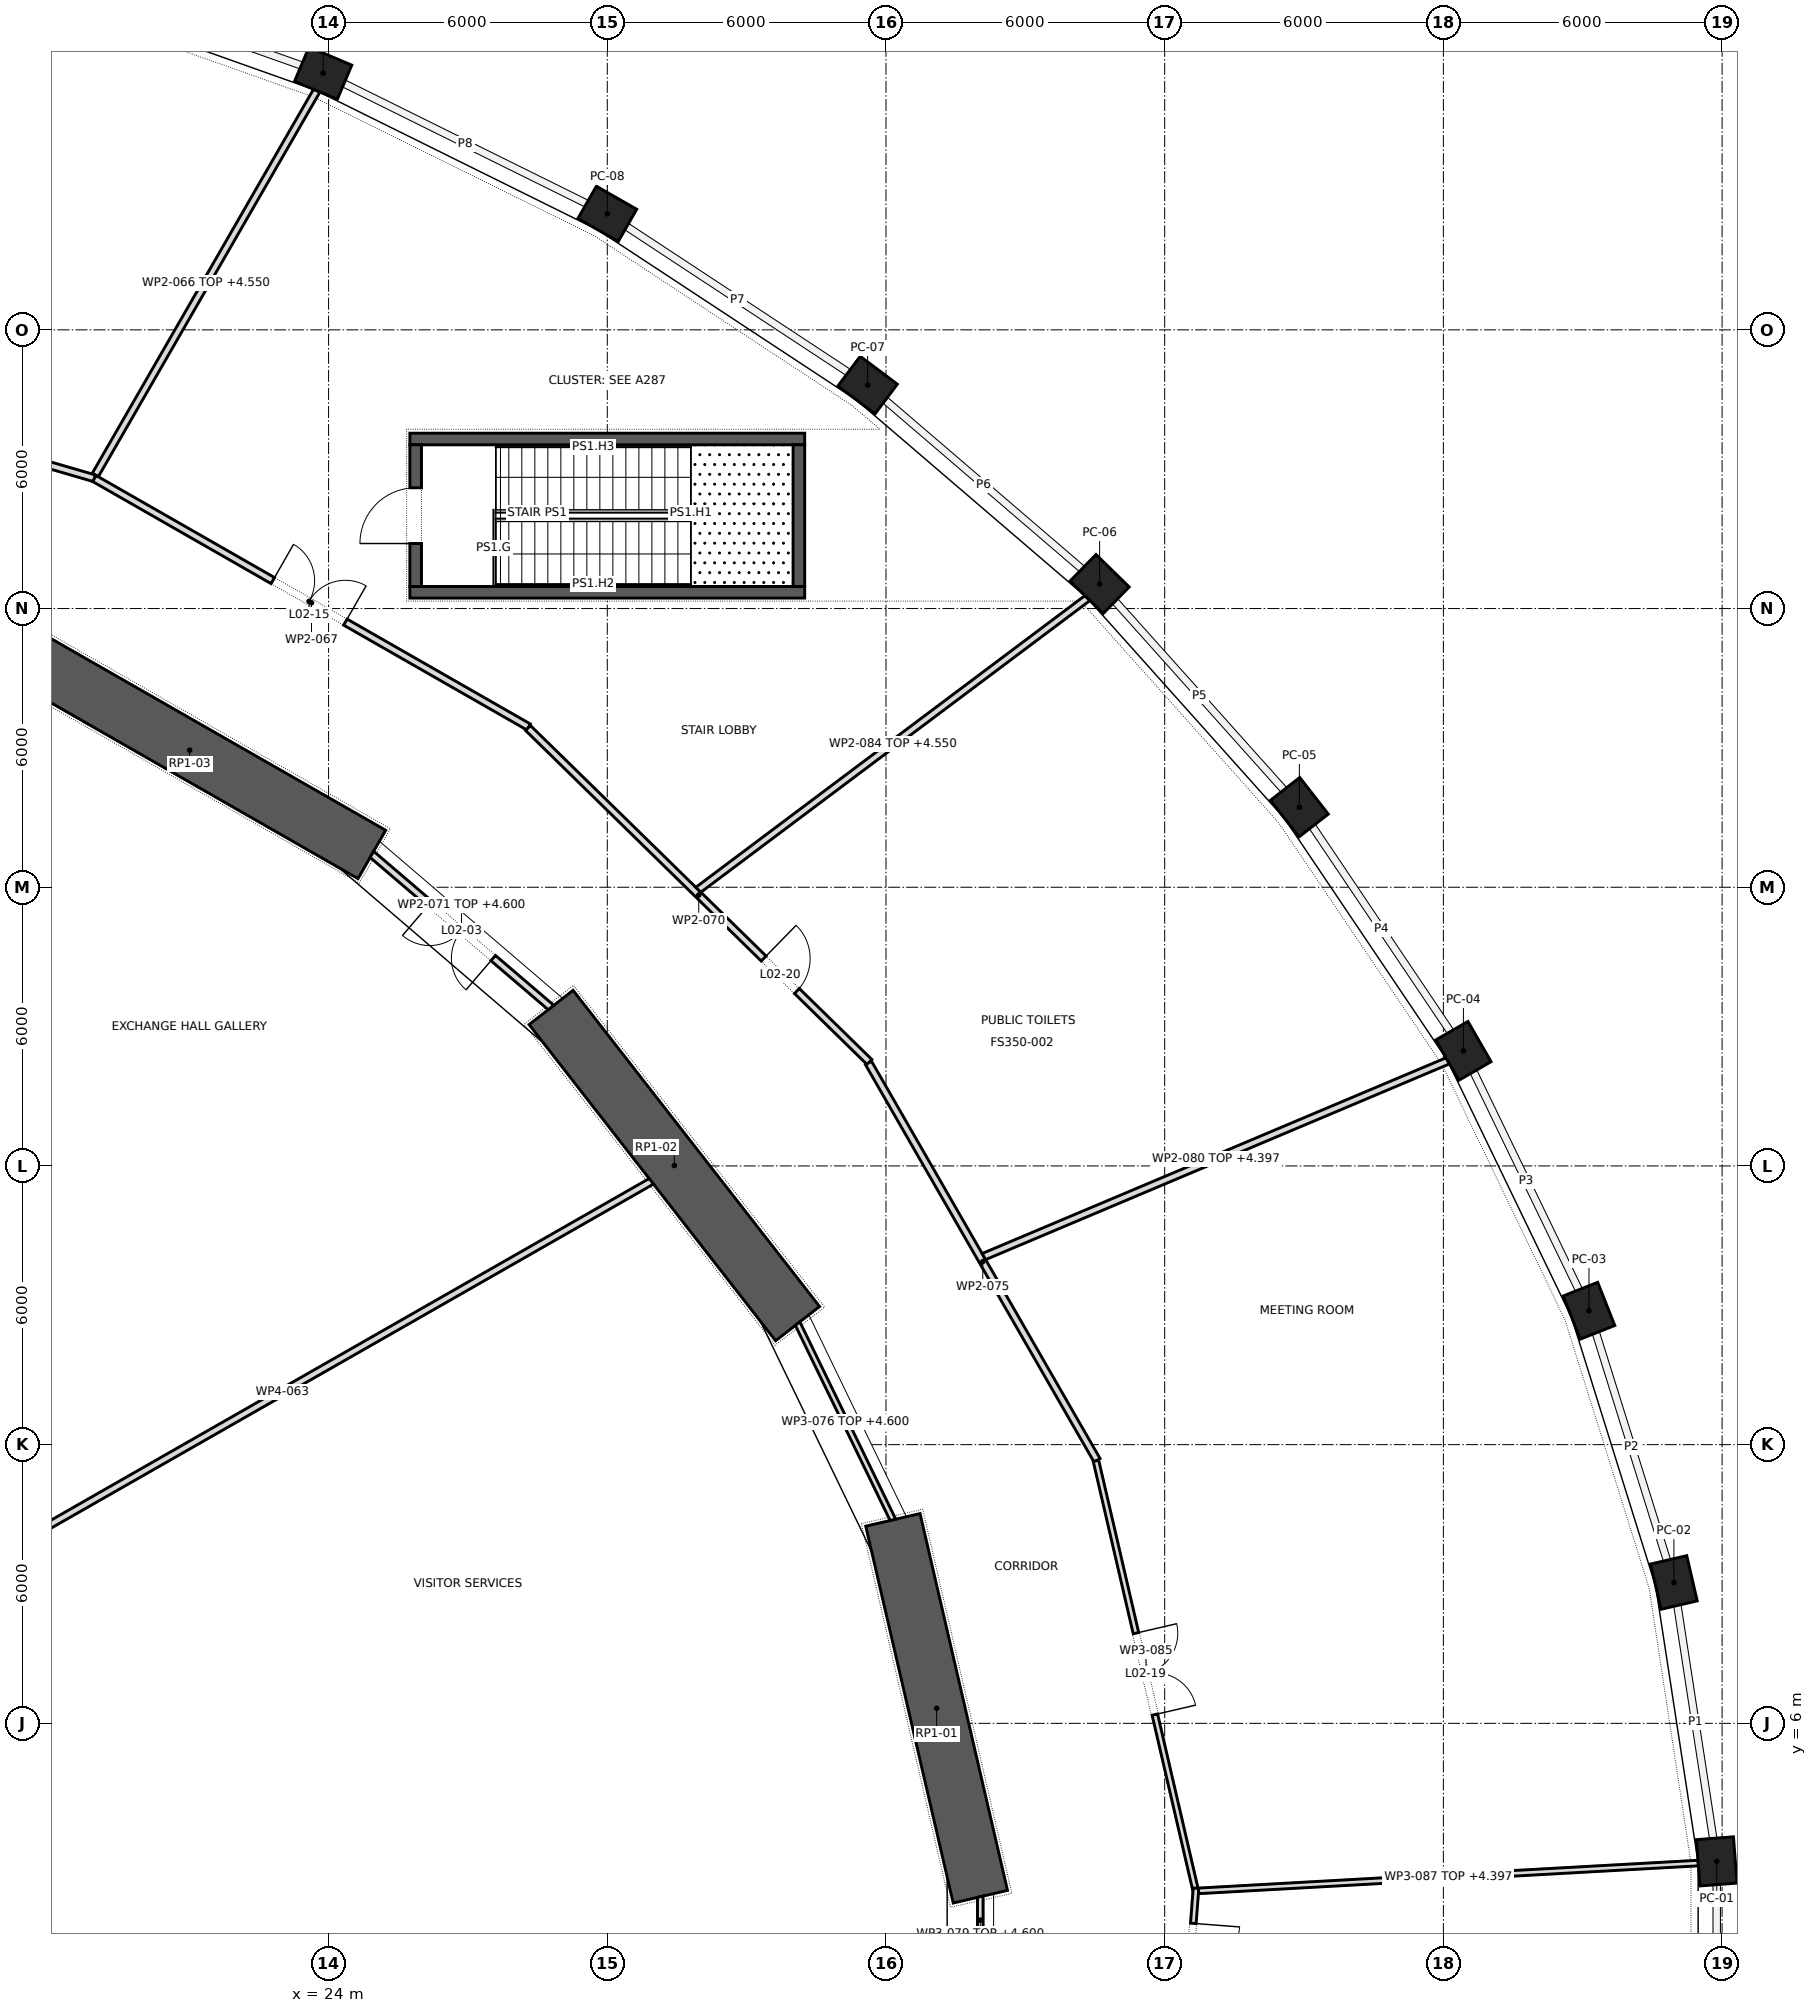
"""IFC4 building model, lengths in metres.
Left out: names, types, materials, properties, quantities, classifications, styles, units other than length and angle.
Written with IfcOpenShell. Run it as: python <this file> out.ifc"""

import sys

from ifc_helpers import new_model, si_unit, direction, frame, frame_2d, origin, origin_2d, place, context, subcontext, project, spatial, polyline, rectangle, outline, extrude, element, fill, save


model = new_model("IFC4")
c1 = context("Model", 3, precision=1e-05, world=origin(), true_north=direction((0.0, 1.0)))
c2 = subcontext(c1, "Body", "Model", "MODEL_VIEW")
j1 = project(units=[si_unit("LENGTHUNIT", "METRE"), si_unit("PLANEANGLEUNIT", "RADIAN")], contexts=[c1])
p1 = place(None, origin())
s1 = spatial("IfcSite", under=j1, at=p1, CompositionType="ELEMENT")
p2 = place(p1, origin())
s2 = spatial("IfcBuilding", under=s1, at=p2, CompositionType="ELEMENT")
p3 = place(p2, frame((0.0, 0.0, 12.5)))
s3 = spatial("IfcBuildingStorey", under=s2, at=p3, CompositionType="ELEMENT", Elevation=12.5)
for number, where, z_axis, x_axis in (
    (1, (53.885, 3.028, 0.0), (0.0, 0.0, 1.0), (-0.076, 0.997, 0.0)),
    (2, (52.962, 9.033, 0.0), (0.0, 0.0, 1.0), (-0.226, 0.974, 0.0)),
    (3, (51.134, 14.883, 0.0), (0.0, 0.0, 1.0), (-0.368, 0.93, 0.0)),
    (4, (48.431, 20.478, 0.0), (0.0, 0.0, 1.0), (-0.499, 0.867, 0.0)),
    (5, (44.899, 25.723, 0.0), (0.0, 0.0, 1.0), (-0.615, 0.789, 0.0)),
    (6, (40.599, 30.528, 0.0), (0.0, 0.0, 1.0), (-0.715, 0.699, 0.0)),
    (7, (35.605, 34.81, 0.0), (0.0, 0.0, 1.0), (-0.799, 0.601, 0.0)),
    (8, (30.001, 38.497, 0.0), (0.0, 0.0, 1.0), (-0.868, 0.497, 0.0)),
    (9, (23.884, 41.525, 0.0), (0.0, 0.0, 1.0), (-0.921, 0.389, 0.0)),
):
    element("IfcColumn", number, at=place(p3, frame(where, z_axis=z_axis, x_axis=x_axis)), inside=s3, PredefinedType="COLUMN", context=c2, shape_type="SweptSolid", body=[
        extrude(rectangle(XDim=1.0, YDim=0.8, at=origin_2d()), origin(), (0.0, 0.0, 1.0), 5.5),
    ])
p4 = place(p3, frame((38.032, 2.267, 0.0), z_axis=(0.0, 0.0, 1.0), x_axis=(-0.226058185805, 0.974113800657, 0.0)))
e10 = element("IfcWall", 10, at=p4, inside=s3, PredefinedType="SHEAR", context=c2, shape_type="SweptSolid", body=[
    extrude(rectangle(XDim=8.329, YDim=1.2, at=frame_2d((4.165, 0.0))), origin(), (0.0, 0.0, 1.0), 5.5),
])
p5 = place(p3, frame((34.097, 14.605, 0.0), z_axis=(0.0, 0.0, 1.0), x_axis=(-0.614825322247, 0.788663314174, 0.0)))
e11 = element("IfcWall", 11, at=p5, inside=s3, PredefinedType="SHEAR", context=c2, shape_type="SweptSolid", body=[
    extrude(rectangle(XDim=8.632, YDim=1.2, at=frame_2d((4.316, 0.0))), origin(), (0.0, 0.0, 1.0), 5.5),
])
p6 = place(p3, frame((24.931, 24.706, 0.0), z_axis=(0.0, 0.0, 1.0), x_axis=(-0.867760656864, 0.496982336103, 0.0)))
e12 = element("IfcWall", 12, at=p6, inside=s3, PredefinedType="SHEAR", context=c2, shape_type="SweptSolid", body=[
    extrude(rectangle(XDim=9.038, YDim=1.2, at=frame_2d((4.519, 0.0))), origin(), (0.0, 0.0, 1.0), 5.5),
])
for number, where, z_axis, x_axis in (
    (13, (25.75, 33.65, 0.0), (0.0, 0.0, 1.0), (1.0, 0.0, 0.0)),
    (14, (25.75, 30.35, 0.0), (0.0, 0.0, 1.0), (1.0, 0.0, 0.0)),
):
    element("IfcWall", number, at=place(p3, frame(where, z_axis=z_axis, x_axis=x_axis)), inside=s3, PredefinedType="SHEAR", context=c2, shape_type="SweptSolid", body=[
        extrude(rectangle(XDim=8.5, YDim=0.25, at=frame_2d((4.25, 0.0))), origin(), (0.0, 0.0, 1.0), 5.15),
    ])
p7 = place(p3, frame((25.875, 30.475, 0.0), z_axis=(0.0, 0.0, 1.0), x_axis=(0.0, 1.0, 0.0)))
e15 = element("IfcWall", 15, at=p7, inside=s3, PredefinedType="SHEAR", context=c2, shape_type="SweptSolid", body=[
    extrude(rectangle(XDim=3.05, YDim=0.25, at=frame_2d((1.525, 0.0))), origin(), (0.0, 0.0, 1.0), 5.15),
])
p8 = place(p7, frame((0.925, 0.0, 0.0)))
e16 = element("IfcOpeningElement", 16, at=p8, cuts=e15, PredefinedType="OPENING", context=c2, shape_type="SweptSolid", body=[
    extrude(rectangle(XDim=1.2, YDim=2.1, at=frame_2d((0.6, 1.05))), frame((0.0, 0.137, 0.0), z_axis=(0.0, -1.0, 0.0), x_axis=(1.0, 0.0, 0.0)), (0.0, 0.0, 1.0), 0.274),
])
p9 = place(p3, frame((34.125, 30.475, 0.0), z_axis=(0.0, 0.0, 1.0), x_axis=(0.0, 1.0, 0.0)))
e17 = element("IfcWall", 17, at=p9, inside=s3, PredefinedType="SHEAR", context=c2, shape_type="SweptSolid", body=[
    extrude(rectangle(XDim=3.05, YDim=0.25, at=frame_2d((1.525, 0.0))), origin(), (0.0, 0.0, 1.0), 5.15),
])
p10 = place(p3, frame((8.446, 35.862, 0.0), z_axis=(0.0, 0.0, 1.0), x_axis=(0.96020899529, -0.27928244729, 0.0)))
e18 = element("IfcWall", 18, at=p10, inside=s3, PredefinedType="PARTITIONING", context=c2, shape_type="SweptSolid", body=[
    extrude(rectangle(XDim=10.95, YDim=0.15, at=frame_2d((5.475, 0.0))), origin(), (0.0, 0.0, 1.0), 5.15),
])
p11 = place(p3, frame((15.06, 8.594, 0.0), z_axis=(0.0, 0.0, 1.0), x_axis=(0.868344118251, 0.495962188376, 0.0)))
e19 = element("IfcWall", 19, at=p11, inside=s3, PredefinedType="PARTITIONING", context=c2, shape_type="SweptSolid", body=[
    extrude(outline(polyline([(0.0, -0.075), (18.308, -0.075), (18.287, 0.075), (0.0, 0.075), (0.0, -0.075)])), origin(), (0.0, 0.0, 1.0), 5.15),
])
p12 = place(p3, frame((18.978, 32.876, 0.0), z_axis=(0.0, 0.0, 1.0), x_axis=(0.499214042651, 0.866478701192, 0.0)))
e20 = element("IfcWall", 20, at=p12, inside=s3, PredefinedType="PARTITIONING", context=c2, shape_type="SweptSolid", body=[
    extrude(outline(polyline([(0.0, -0.075), (9.558, -0.075), (9.54, 0.075), (0.0, 0.075), (0.0, -0.075)])), origin(), (0.0, 0.0, 1.0), 4.55),
])
p13 = place(p3, frame((18.958, 32.8, 0.0), z_axis=(0.0, 0.0, 1.0), x_axis=(0.867958465669, -0.496636790697, 0.0)))
e21 = element("IfcWall", 21, at=p13, inside=s3, PredefinedType="PARTITIONING", context=c2, shape_type="SweptSolid", body=[
    extrude(rectangle(XDim=10.772, YDim=0.15, at=frame_2d((5.386, 0.0))), origin(), (0.0, 0.0, 1.0), 5.15),
])
p14 = place(p13, frame((4.425, 0.0, 0.0)))
e22 = element("IfcOpeningElement", 22, at=p14, cuts=e21, PredefinedType="OPENING", context=c2, shape_type="SweptSolid", body=[
    extrude(rectangle(XDim=1.8, YDim=2.1, at=frame_2d((0.9, 1.05))), frame((0.0, 0.087, 0.0), z_axis=(0.0, -1.0, 0.0), x_axis=(1.0, 0.0, 0.0)), (0.0, 0.0, 1.0), 0.174),
])
p15 = place(p3, frame((28.294, 27.428, 0.0), z_axis=(0.0, 0.0, 1.0), x_axis=(0.71483918539, -0.699288880958, 0.0)))
e23 = element("IfcWall", 23, at=p15, inside=s3, PredefinedType="PARTITIONING", context=c2, shape_type="SweptSolid", body=[
    extrude(rectangle(XDim=10.283, YDim=0.15, at=frame_2d((5.142, 0.0))), origin(), (0.0, 0.0, 1.0), 5.15),
])
p16 = place(p15, frame((7.097, 0.0, 0.0)))
e24 = element("IfcOpeningElement", 24, at=p16, cuts=e23, PredefinedType="OPENING", context=c2, shape_type="SweptSolid", body=[
    extrude(rectangle(XDim=1.0, YDim=2.1, at=frame_2d((0.5, 1.05))), frame((0.0, 0.087, 0.0), z_axis=(0.0, -1.0, 0.0), x_axis=(1.0, 0.0, 0.0)), (0.0, 0.0, 1.0), 0.174),
])
p17 = place(p3, frame((28.789, 21.411, 0.0), z_axis=(0.0, 0.0, 1.0), x_axis=(-0.760084552743, 0.649824185978, 0.0)))
e25 = element("IfcWall", 25, at=p17, inside=s3, PredefinedType="PARTITIONING", context=c2, shape_type="SweptSolid", body=[
    extrude(outline(polyline([(-0.015, -0.075), (5.089, -0.075), (5.061, 0.075), (0.015, 0.075), (-0.015, -0.075)])), origin(), (0.0, 0.0, 1.0), 4.6),
])
p18 = place(p17, frame((1.638, 0.0, 0.0)))
e26 = element("IfcOpeningElement", 26, at=p18, cuts=e25, PredefinedType="OPENING", context=c2, shape_type="SweptSolid", body=[
    extrude(rectangle(XDim=1.8, YDim=2.1, at=frame_2d((0.9, 1.05))), frame((0.0, 0.087, 0.0), z_axis=(0.0, -1.0, 0.0), x_axis=(1.0, 0.0, 0.0)), (0.0, 0.0, 1.0), 0.174),
])
p19 = place(p3, frame((35.624, 20.216, 0.0), z_axis=(0.0, 0.0, 1.0), x_axis=(0.49865472402, -0.866800707321, 0.0)))
e27 = element("IfcWall", 27, at=p19, inside=s3, PredefinedType="PARTITIONING", context=c2, shape_type="SweptSolid", body=[
    extrude(rectangle(XDim=9.868, YDim=0.15, at=frame_2d((4.934, 0.0))), origin(), (0.0, 0.0, 1.0), 5.15),
])
p20 = place(p3, frame((36.15, 10.38, 0.0), z_axis=(0.0, 0.0, 1.0), x_axis=(-0.436936398764, 0.899492403212, 0.0)))
e28 = element("IfcWall", 28, at=p20, inside=s3, PredefinedType="PARTITIONING", context=c2, shape_type="SweptSolid", body=[
    extrude(outline(polyline([(-0.014, -0.06), (4.711, -0.06), (4.685, 0.06), (0.014, 0.06), (-0.014, -0.06)])), origin(), (0.0, 0.0, 1.0), 4.6),
])
p21 = place(p3, frame((38.03, 1.26, 0.0), z_axis=(0.0, 0.0, 1.0), x_axis=(0.0, 1.0, 0.0)))
e29 = element("IfcWall", 29, at=p21, inside=s3, PredefinedType="PARTITIONING", context=c2, shape_type="SweptSolid", body=[
    extrude(outline(polyline([(0.0, -0.06), (1.021, -0.06), (0.994, 0.06), (0.0, 0.06), (0.0, -0.06)])), origin(), (0.0, 0.0, 1.0), 4.6),
])
p22 = place(p3, frame((38.107, 16.048, 0.0), z_axis=(0.0, 0.0, 1.0), x_axis=(0.92132899404, 0.3887838535, 0.0)))
e30 = element("IfcWall", 30, at=p22, inside=s3, PredefinedType="PARTITIONING", context=c2, shape_type="SweptSolid", body=[
    extrude(outline(polyline([(0.009, -0.075), (10.849, -0.075), (10.831, 0.075), (-0.009, 0.075), (0.009, -0.075)])), origin(), (0.0, 0.0, 1.0), 4.397),
])
p23 = place(p3, frame((40.337, 30.226, 0.0), z_axis=(0.0, 0.0, 1.0), x_axis=(-0.800117504973, -0.599843294732, 0.0)))
e31 = element("IfcWall", 31, at=p23, inside=s3, PredefinedType="PARTITIONING", context=c2, shape_type="SweptSolid", body=[
    extrude(outline(polyline([(0.011, -0.075), (10.482, -0.075), (10.459, 0.075), (-0.011, 0.075), (0.011, -0.075)])), origin(), (0.0, 0.0, 1.0), 4.55),
])
p24 = place(p3, frame((40.521, 11.65, 0.0), z_axis=(0.0, 0.0, 1.0), x_axis=(0.226075864332, -0.974109697912, 0.0)))
e32 = element("IfcWall", 32, at=p24, inside=s3, PredefinedType="PARTITIONING", context=c2, shape_type="SweptSolid", body=[
    extrude(rectangle(XDim=9.527, YDim=0.12, at=frame_2d((4.763, 0.0))), origin(), (0.0, 0.0, 1.0), 5.15),
])
p25 = place(p24, frame((3.807, 0.0, 0.0)))
e33 = element("IfcOpeningElement", 33, at=p25, cuts=e32, PredefinedType="OPENING", context=c2, shape_type="SweptSolid", body=[
    extrude(rectangle(XDim=1.8, YDim=2.1, at=frame_2d((0.9, 1.05))), frame((0.0, 0.072, 0.0), z_axis=(0.0, -1.0, 0.0), x_axis=(1.0, 0.0, 0.0)), (0.0, 0.0, 1.0), 0.144),
])
p26 = place(p3, frame((41.947, -7.04, 0.0), z_axis=(0.0, 0.0, 1.0), x_axis=(0.076437580216, 0.997074368506, 0.0)))
e34 = element("IfcWall", 34, at=p26, inside=s3, PredefinedType="PARTITIONING", context=c2, shape_type="SweptSolid", body=[
    extrude(rectangle(XDim=9.518, YDim=0.12, at=frame_2d((4.759, 0.0))), origin(), (0.0, 0.0, 1.0), 5.15),
])
p27 = place(p26, frame((7.759, 0.0, 0.0)))
e35 = element("IfcOpeningElement", 35, at=p27, cuts=e34, PredefinedType="OPENING", context=c2, shape_type="SweptSolid", body=[
    extrude(rectangle(XDim=1.0, YDim=2.1, at=frame_2d((0.5, 1.05))), frame((0.0, 0.072, 0.0), z_axis=(0.0, -1.0, 0.0), x_axis=(1.0, 0.0, 0.0)), (0.0, 0.0, 1.0), 0.144),
])
p28 = place(p3, frame((53.487, 2.992, 0.0), z_axis=(0.0, 0.0, 1.0), x_axis=(-0.998454909458, -0.055567920423, 0.0)))
e36 = element("IfcWall", 36, at=p28, inside=s3, PredefinedType="PARTITIONING", context=c2, shape_type="SweptSolid", body=[
    extrude(outline(polyline([(0.001, -0.06), (10.773, -0.06), (10.773, 0.06), (-0.001, 0.06), (0.001, -0.06)])), origin(), (0.0, 0.0, 1.0), 4.397),
])
p29 = place(p8, origin())
e37 = element("IfcDoor", 37, at=p29, inside=s3, OperationType="SINGLE_SWING_RIGHT", PredefinedType="DOOR", context=c2, shape_type="SweptSolid", body=[
    extrude(rectangle(XDim=1.2, YDim=2.1, at=frame_2d((0.6, 1.05))), frame((0.0, 0.025, 0.0), z_axis=(0.0, -1.0, 0.0), x_axis=(1.0, 0.0, 0.0)), (0.0, 0.0, 1.0), 0.05),
])
fill(e16, e37)
p30 = place(p18, origin())
e38 = element("IfcDoor", 38, at=p30, inside=s3, OperationType="DOUBLE_DOOR_SINGLE_SWING", PredefinedType="DOOR", context=c2, shape_type="SweptSolid", body=[
    extrude(rectangle(XDim=1.8, YDim=2.1, at=frame_2d((0.9, 1.05))), frame((0.0, 0.025, 0.0), z_axis=(0.0, -1.0, 0.0), x_axis=(1.0, 0.0, 0.0)), (0.0, 0.0, 1.0), 0.05),
])
fill(e26, e38)
p31 = place(p14, origin())
e39 = element("IfcDoor", 39, at=p31, inside=s3, OperationType="DOUBLE_DOOR_SINGLE_SWING", PredefinedType="DOOR", context=c2, shape_type="SweptSolid", body=[
    extrude(rectangle(XDim=1.8, YDim=2.1, at=frame_2d((0.9, 1.05))), frame((0.0, 0.025, 0.0), z_axis=(0.0, -1.0, 0.0), x_axis=(1.0, 0.0, 0.0)), (0.0, 0.0, 1.0), 0.05),
])
fill(e22, e39)
p32 = place(p25, origin())
e40 = element("IfcDoor", 40, at=p32, inside=s3, OperationType="DOUBLE_DOOR_SINGLE_SWING", PredefinedType="DOOR", context=c2, shape_type="SweptSolid", body=[
    extrude(rectangle(XDim=1.8, YDim=2.1, at=frame_2d((0.9, 1.05))), frame((0.0, 0.025, 0.0), z_axis=(0.0, -1.0, 0.0), x_axis=(1.0, 0.0, 0.0)), (0.0, 0.0, 1.0), 0.05),
])
fill(e33, e40)
p33 = place(p16, origin())
e41 = element("IfcDoor", 41, at=p33, inside=s3, OperationType="SINGLE_SWING_RIGHT", PredefinedType="DOOR", context=c2, shape_type="SweptSolid", body=[
    extrude(rectangle(XDim=1.0, YDim=2.1, at=frame_2d((0.5, 1.05))), frame((0.0, 0.025, 0.0), z_axis=(0.0, -1.0, 0.0), x_axis=(1.0, 0.0, 0.0)), (0.0, 0.0, 1.0), 0.05),
])
fill(e24, e41)
p34 = place(p27, frame((1.0, 0.0, 0.0), z_axis=(0.0, 0.0, 1.0), x_axis=(-1.0, 0.0, 0.0)))
e42 = element("IfcDoor", 42, at=p34, inside=s3, OperationType="SINGLE_SWING_RIGHT", PredefinedType="DOOR", context=c2, shape_type="SweptSolid", body=[
    extrude(rectangle(XDim=1.0, YDim=2.1, at=frame_2d((0.5, 1.05))), frame((0.0, 0.025, 0.0), z_axis=(0.0, -1.0, 0.0), x_axis=(1.0, 0.0, 0.0)), (0.0, 0.0, 1.0), 0.05),
])
fill(e35, e42)
save(model, sys.argv[1])
